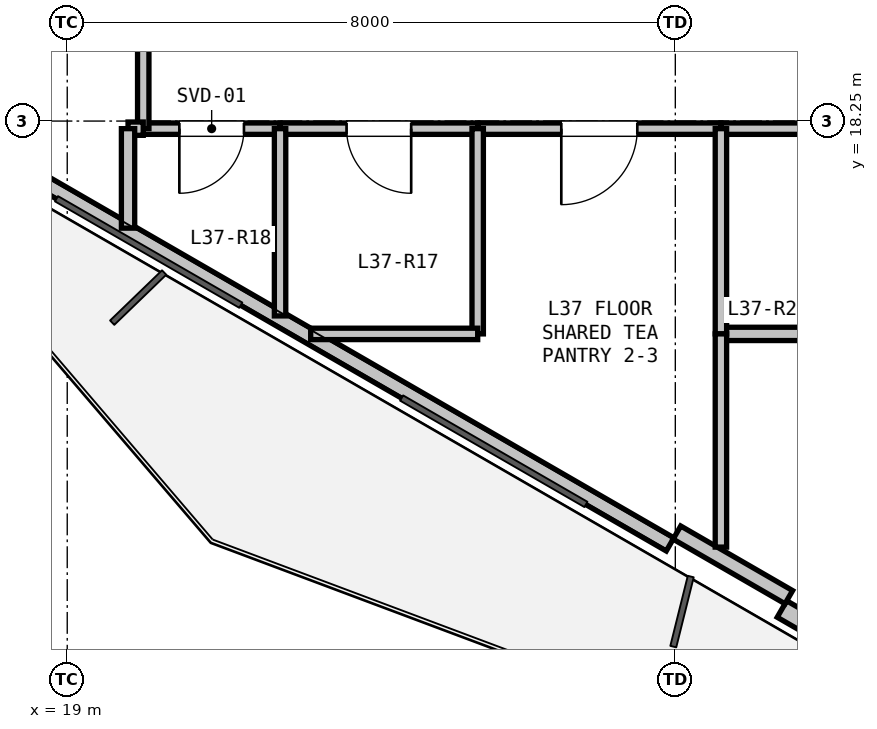
"""IFC4 building model, lengths in metres.
Left out: names, types, materials, properties, quantities, classifications, styles, units other than length and angle.
Written with IfcOpenShell. Run it as: python <this file> out.ifc"""

import sys

from ifc_helpers import new_model, si_unit, direction, frame, frame_2d, origin, place, context, subcontext, project, spatial, rectangle, extrude, element, fill, save


model = new_model("IFC4")
c1 = context("Model", 3, precision=1e-05, world=origin(), true_north=direction((0.0, 1.0)))
c2 = subcontext(c1, "Body", "Model", "MODEL_VIEW")
j1 = project(units=[si_unit("LENGTHUNIT", "METRE"), si_unit("PLANEANGLEUNIT", "RADIAN")], contexts=[c1])
p1 = place(None, origin())
s1 = spatial("IfcSite", under=j1, at=p1, CompositionType="ELEMENT")
p2 = place(p1, origin())
s2 = spatial("IfcBuilding", under=s1, at=p2, CompositionType="ELEMENT")
p3 = place(p2, frame((0.0, 0.0, 134.4)))
s3 = spatial("IfcBuildingStorey", under=s2, at=p3, CompositionType="ELEMENT", Elevation=134.4)
p4 = place(p3, frame((38.091, 6.237, 0.0), z_axis=(0.0, 0.0, 1.0), x_axis=(-0.86602239209, 0.500005216371, 0.0)))
e1 = element("IfcWall", 1, at=p4, inside=s3, PredefinedType="SOLIDWALL", context=c2, shape_type="SweptSolid", body=[
    extrude(rectangle(XDim=11.186, YDim=0.25, at=frame_2d((5.593, 0.0))), origin(), (0.0, 0.0, 1.0), 2.68),
])
p5 = place(p4, frame((7.095, 0.0, 0.0)))
e2 = element("IfcOpeningElement", 2, at=p5, cuts=e1, PredefinedType="OPENING", context=c2, shape_type="SweptSolid", body=[
    extrude(rectangle(XDim=1.1, YDim=2.1, at=frame_2d((0.55, 1.05))), frame((0.0, 0.135, 0.0), z_axis=(0.0, -1.0, 0.0), x_axis=(1.0, 0.0, 0.0)), (0.0, 0.0, 1.0), 0.27),
])
p6 = place(p4, frame((2.02, 0.0, 0.9)))
e3 = element("IfcOpeningElement", 3, at=p6, cuts=e1, PredefinedType="OPENING", context=c2, shape_type="SweptSolid", body=[
    extrude(rectangle(XDim=1.2, YDim=1.4, at=frame_2d((0.6, 0.7))), frame((0.0, 0.135, 0.0), z_axis=(0.0, -1.0, 0.0), x_axis=(1.0, 0.0, 0.0)), (0.0, 0.0, 1.0), 0.27),
])
p7 = place(p3, frame((26.931, 12.68, 0.0), z_axis=(0.0, 0.0, 1.0), x_axis=(-0.866026619769, 0.499997893847, 0.0)))
e4 = element("IfcWall", 4, at=p7, inside=s3, PredefinedType="PARAPET", context=c2, shape_type="SweptSolid", body=[
    extrude(rectangle(XDim=10.486, YDim=0.2, at=frame_2d((5.243, 0.0))), origin(), (0.0, 0.0, 1.0), 0.2),
])
p8 = place(p3, frame((28.493, 11.986, 0.0), z_axis=(0.0, 0.0, 1.0), x_axis=(-0.86605165483, 0.499954529098, 0.0)))
e5 = element("IfcWall", 5, at=p8, inside=s3, PredefinedType="PARAPET", context=c2, shape_type="SweptSolid", body=[
    extrude(rectangle(XDim=1.7, YDim=0.2, at=frame_2d((0.85, 0.0))), origin(), (0.0, 0.0, 1.0), 2.68),
])
p9 = place(p3, frame((29.6, 18.15, 0.0), z_axis=(0.0, 0.0, 1.0), x_axis=(-1.0, 0.0, 0.0)))
e6 = element("IfcWall", 6, at=p9, inside=s3, PredefinedType="PARTITIONING", context=c2, shape_type="SweptSolid", body=[
    extrude(rectangle(XDim=2.0, YDim=0.15, at=frame_2d((1.0, 0.0))), origin(), (0.0, 0.0, 1.0), 3.06),
])
p10 = place(p3, frame((27.6, 18.15, 0.0), z_axis=(0.0, 0.0, 1.0), x_axis=(-1.0, 0.0, 0.0)))
e7 = element("IfcWall", 7, at=p10, inside=s3, PredefinedType="PARTITIONING", context=c2, shape_type="SweptSolid", body=[
    extrude(rectangle(XDim=3.2, YDim=0.15, at=frame_2d((1.6, 0.0))), origin(), (0.0, 0.0, 1.0), 2.433),
])
p11 = place(p10, frame((1.1, 0.0, 0.0)))
e8 = element("IfcOpeningElement", 8, at=p11, cuts=e7, PredefinedType="OPENING", context=c2, shape_type="SweptSolid", body=[
    extrude(rectangle(XDim=1.0, YDim=2.15, at=frame_2d((0.5, 1.075))), frame((0.0, 0.085, 0.0), z_axis=(0.0, -1.0, 0.0), x_axis=(1.0, 0.0, 0.0)), (0.0, 0.0, 1.0), 0.17),
])
p12 = place(p3, frame((24.4, 18.15, 0.0), z_axis=(0.0, 0.0, 1.0), x_axis=(-1.0, 0.0, 0.0)))
e9 = element("IfcWall", 9, at=p12, inside=s3, PredefinedType="PARTITIONING", context=c2, shape_type="SweptSolid", body=[
    extrude(rectangle(XDim=2.6, YDim=0.15, at=frame_2d((1.3, 0.0))), origin(), (0.0, 0.0, 1.0), 2.433),
])
p13 = place(p12, frame((0.875, 0.0, 0.0)))
e10 = element("IfcOpeningElement", 10, at=p13, cuts=e9, PredefinedType="OPENING", context=c2, shape_type="SweptSolid", body=[
    extrude(rectangle(XDim=0.85, YDim=2.1, at=frame_2d((0.425, 1.05))), frame((0.0, 0.085, 0.0), z_axis=(0.0, -1.0, 0.0), x_axis=(1.0, 0.0, 0.0)), (0.0, 0.0, 1.0), 0.17),
])
p14 = place(p3, frame((21.8, 18.15, 0.0), z_axis=(0.0, 0.0, 1.0), x_axis=(-1.0, 0.0, 0.0)))
e11 = element("IfcWall", 11, at=p14, inside=s3, PredefinedType="PARTITIONING", context=c2, shape_type="SweptSolid", body=[
    extrude(rectangle(XDim=1.8, YDim=0.15, at=frame_2d((0.9, 0.0))), origin(), (0.0, 0.0, 1.0), 3.06),
])
p15 = place(p14, frame((0.475, 0.0, 0.0)))
e12 = element("IfcOpeningElement", 12, at=p15, cuts=e11, PredefinedType="OPENING", context=c2, shape_type="SweptSolid", body=[
    extrude(rectangle(XDim=0.85, YDim=2.1, at=frame_2d((0.425, 1.05))), frame((0.0, 0.085, 0.0), z_axis=(0.0, -1.0, 0.0), x_axis=(1.0, 0.0, 0.0)), (0.0, 0.0, 1.0), 0.17),
])
p16 = place(p3, frame((20.0, 18.15, 0.0), z_axis=(0.0, 0.0, 1.0), x_axis=(0.0, 1.0, 0.0)))
e13 = element("IfcWall", 13, at=p16, inside=s3, PredefinedType="PARTITIONING", context=c2, shape_type="SweptSolid", body=[
    extrude(rectangle(XDim=2.6, YDim=0.15, at=frame_2d((1.3, 0.0))), origin(), (0.0, 0.0, 1.0), 3.06),
])
p17 = place(p3, frame((19.8, 18.15, 0.0), z_axis=(0.0, 0.0, 1.0), x_axis=(1.0, 0.0, 0.0)))
e14 = element("IfcWall", 14, at=p17, inside=s3, PredefinedType="PLUMBINGWALL", context=c2, shape_type="SweptSolid", body=[
    extrude(rectangle(XDim=0.2, YDim=0.175, at=frame_2d((0.1, 0.0))), origin(), (0.0, 0.0, 1.0), 3.06),
])
p18 = place(p3, frame((21.8, 18.15, 0.0), z_axis=(0.0, 0.0, 1.0), x_axis=(0.0, -1.0, 0.0)))
e15 = element("IfcWall", 15, at=p18, inside=s3, PredefinedType="PARTITIONING", context=c2, shape_type="SweptSolid", body=[
    extrude(rectangle(XDim=2.463, YDim=0.15, at=frame_2d((1.232, 0.0))), origin(), (0.0, 0.0, 1.0), 2.365),
])
p19 = place(p3, frame((19.8, 16.841, 0.0), z_axis=(0.0, 0.0, 1.0), x_axis=(0.0, 1.0, 0.0)))
e16 = element("IfcWall", 16, at=p19, inside=s3, PredefinedType="PLUMBINGWALL", context=c2, shape_type="SweptSolid", body=[
    extrude(rectangle(XDim=1.309, YDim=0.175, at=frame_2d((0.654, 0.0))), origin(), (0.0, 0.0, 1.0), 2.365),
])
p20 = place(p3, frame((29.6, 15.45, 0.0), z_axis=(0.0, 0.0, 1.0), x_axis=(-1.0, 0.0, 0.0)))
e17 = element("IfcWall", 17, at=p20, inside=s3, PredefinedType="PLUMBINGWALL", context=c2, shape_type="SweptSolid", body=[
    extrude(rectangle(XDim=2.0, YDim=0.175, at=frame_2d((1.0, 0.0))), origin(), (0.0, 0.0, 1.0), 3.06),
])
p21 = place(p3, frame((27.6, 15.45, 0.0), z_axis=(0.0, 0.0, 1.0), x_axis=(0.0, 1.0, 0.0)))
e18 = element("IfcWall", 18, at=p21, inside=s3, PredefinedType="PARTITIONING", context=c2, shape_type="SweptSolid", body=[
    extrude(rectangle(XDim=2.7, YDim=0.15, at=frame_2d((1.35, 0.0))), origin(), (0.0, 0.0, 1.0), 3.06),
])
p22 = place(p3, frame((24.4, 18.15, 0.0), z_axis=(0.0, 0.0, 1.0), x_axis=(0.0, -1.0, 0.0)))
e19 = element("IfcWall", 19, at=p22, inside=s3, PredefinedType="PARTITIONING", context=c2, shape_type="SweptSolid", body=[
    extrude(rectangle(XDim=2.7, YDim=0.15, at=frame_2d((1.35, 0.0))), origin(), (0.0, 0.0, 1.0), 2.433),
])
p23 = place(p3, frame((24.4, 15.45, 0.0), z_axis=(0.0, 0.0, 1.0), x_axis=(-1.0, 0.0, 0.0)))
e20 = element("IfcWall", 20, at=p23, inside=s3, PredefinedType="PARTITIONING", context=c2, shape_type="SweptSolid", body=[
    extrude(rectangle(XDim=2.197, YDim=0.15, at=frame_2d((1.099, 0.0))), origin(), (0.0, 0.0, 1.0), 2.365),
])
p24 = place(p3, frame((27.6, 15.45, 0.0), z_axis=(0.0, 0.0, 1.0), x_axis=(0.0, -1.0, 0.0)))
e21 = element("IfcWall", 21, at=p24, inside=s3, PredefinedType="PARTITIONING", context=c2, shape_type="SweptSolid", body=[
    extrude(rectangle(XDim=2.805, YDim=0.15, at=frame_2d((1.402, 0.0))), origin(), (0.0, 0.0, 1.0), 2.365),
])
p25 = place(p15, origin())
e22 = element("IfcDoor", 22, at=p25, inside=s3, OperationType="SINGLE_SWING_RIGHT", PredefinedType="DOOR", context=c2, shape_type="SweptSolid", body=[
    extrude(rectangle(XDim=0.85, YDim=2.1, at=frame_2d((0.425, 1.05))), frame((0.0, 0.025, 0.0), z_axis=(0.0, -1.0, 0.0), x_axis=(1.0, 0.0, 0.0)), (0.0, 0.0, 1.0), 0.05),
])
fill(e12, e22)
p26 = place(p13, origin())
e23 = element("IfcDoor", 23, at=p26, inside=s3, OperationType="SINGLE_SWING_LEFT", PredefinedType="DOOR", context=c2, shape_type="SweptSolid", body=[
    extrude(rectangle(XDim=0.85, YDim=2.1, at=frame_2d((0.425, 1.05))), frame((0.0, 0.025, 0.0), z_axis=(0.0, -1.0, 0.0), x_axis=(1.0, 0.0, 0.0)), (0.0, 0.0, 1.0), 0.05),
])
fill(e10, e23)
p27 = place(p11, origin())
e24 = element("IfcDoor", 24, at=p27, inside=s3, OperationType="SINGLE_SWING_RIGHT", PredefinedType="DOOR", context=c2, shape_type="SweptSolid", body=[
    extrude(rectangle(XDim=1.0, YDim=2.15, at=frame_2d((0.5, 1.075))), frame((0.0, 0.025, 0.0), z_axis=(0.0, -1.0, 0.0), x_axis=(1.0, 0.0, 0.0)), (0.0, 0.0, 1.0), 0.05),
])
fill(e8, e24)
save(model, sys.argv[1])
